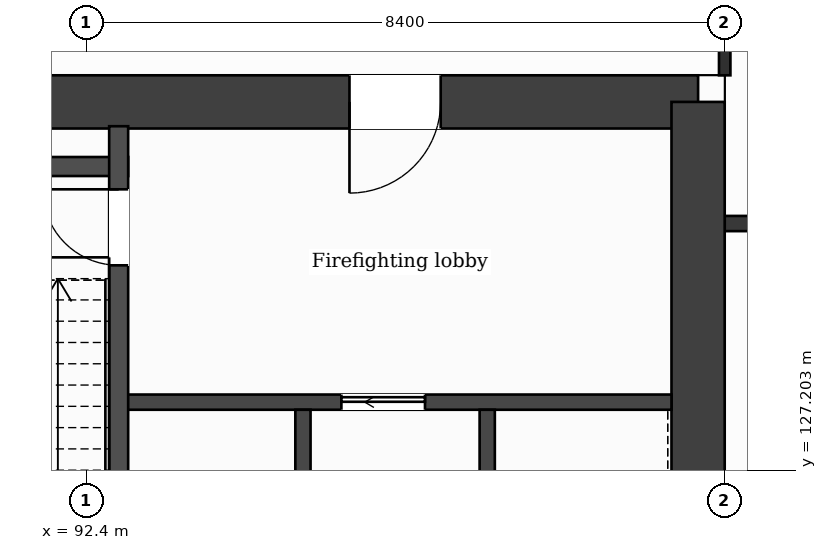
"""IFC4 building model, lengths in metres.
Left out: names, types, materials, properties, quantities, classifications, styles, units other than length and angle.
Written with IfcOpenShell. Run it as: python <this file> out.ifc"""

import sys

from ifc_helpers import new_model, si_unit, direction, frame, frame_2d, origin, place, context, subcontext, project, spatial, rectangle, extrude, element, fill, save


model = new_model("IFC4")
c1 = context("Model", 3, precision=1e-05, world=origin(), true_north=direction((0.0, 1.0)))
c2 = subcontext(c1, "Body", "Model", "MODEL_VIEW")
j1 = project(units=[si_unit("LENGTHUNIT", "METRE"), si_unit("PLANEANGLEUNIT", "RADIAN")], contexts=[c1])
p1 = place(None, origin())
s1 = spatial("IfcSite", under=j1, at=p1, CompositionType="ELEMENT")
p2 = place(p1, origin())
s2 = spatial("IfcBuilding", under=s1, at=p2, CompositionType="ELEMENT")
p3 = place(p2, frame((0.0, 0.0, 277.5)))
s3 = spatial("IfcBuildingStorey", under=s2, at=p3, CompositionType="ELEMENT", Elevation=277.5)
p4 = place(p3, frame((88.937, 132.05, 0.0), z_axis=(0.0, 0.0, 1.0), x_axis=(1.0, 0.0, 0.0)))
e1 = element("IfcWall", 1, at=p4, inside=s3, PredefinedType="SHEAR", context=c2, shape_type="SweptSolid", body=[
    extrude(rectangle(XDim=11.513, YDim=0.7, at=frame_2d((5.757, 0.0))), origin(), (0.0, 0.0, 1.0), 3.7),
])
p5 = place(p4, frame((6.927, 0.0, 0.0)))
e2 = element("IfcOpeningElement", 2, at=p5, cuts=e1, PredefinedType="OPENING", context=c2, shape_type="SweptSolid", body=[
    extrude(rectangle(XDim=1.2, YDim=2.1, at=frame_2d((0.6, 1.05))), frame((0.0, 0.36, 0.0), z_axis=(0.0, -1.0, 0.0), x_axis=(1.0, 0.0, 0.0)), (0.0, 0.0, 1.0), 0.72),
])
p6 = place(p3, frame((100.45, 132.05, 0.0), z_axis=(0.0, 0.0, 1.0), x_axis=(0.0, -1.0, 0.0)))
e3 = element("IfcWall", 3, at=p6, inside=s3, PredefinedType="SHEAR", context=c2, shape_type="SweptSolid", body=[
    extrude(rectangle(XDim=21.3, YDim=0.7, at=frame_2d((10.65, 0.0))), origin(), (0.0, 0.0, 1.0), 3.7),
])
p7 = place(p6, frame((7.9, 0.0, 0.0)))
e4 = element("IfcOpeningElement", 4, at=p7, cuts=e3, PredefinedType="OPENING", context=c2, shape_type="SweptSolid", body=[
    extrude(rectangle(XDim=1.4, YDim=2.1, at=frame_2d((0.7, 1.05))), frame((0.0, 0.36, 0.0), z_axis=(0.0, -1.0, 0.0), x_axis=(1.0, 0.0, 0.0)), (0.0, 0.0, 1.0), 0.72),
])
p8 = place(p3, frame((92.827, 128.1, 0.0), z_axis=(0.0, 0.0, 1.0), x_axis=(1.0, 0.0, 0.0)))
e5 = element("IfcWall", 5, at=p8, inside=s3, PredefinedType="PARTITIONING", context=c2, shape_type="SweptSolid", body=[
    extrude(rectangle(XDim=7.273, YDim=0.2, at=frame_2d((3.637, 0.0))), origin(), (0.0, 0.0, 1.0), 3.38),
])
p9 = place(p8, frame((2.93, 0.0, 0.0)))
e6 = element("IfcOpeningElement", 6, at=p9, cuts=e5, PredefinedType="OPENING", context=c2, shape_type="SweptSolid", body=[
    extrude(rectangle(XDim=1.1, YDim=2.1, at=frame_2d((0.55, 1.05))), frame((0.0, 0.11, 0.0), z_axis=(0.0, -1.0, 0.0), x_axis=(1.0, 0.0, 0.0)), (0.0, 0.0, 1.0), 0.22),
])
p10 = place(p3, frame((100.8, 130.45, 0.0), z_axis=(0.0, 0.0, 1.0), x_axis=(1.0, 0.0, 0.0)))
e7 = element("IfcWall", 7, at=p10, inside=s3, PredefinedType="PARTITIONING", context=c2, shape_type="SweptSolid", body=[
    extrude(rectangle(XDim=3.1, YDim=0.2, at=frame_2d((1.55, 0.0))), origin(), (0.0, 0.0, 1.0), 3.38),
])
p11 = place(p3, frame((89.146, 131.2, 0.0), z_axis=(0.0, 0.0, 1.0), x_axis=(1.0, 0.0, 0.0)))
e8 = element("IfcWall", 8, at=p11, inside=s3, PredefinedType="PARTITIONING", context=c2, shape_type="SweptSolid", body=[
    extrude(rectangle(XDim=3.806, YDim=0.25, at=frame_2d((1.903, 0.0))), origin(), (0.0, 0.0, 1.0), 3.38),
])
p12 = place(p3, frame((92.827, 124.575, 0.0), z_axis=(0.0, 0.0, 1.0), x_axis=(0.0, 1.0, 0.0)))
e9 = element("IfcWall", 9, at=p12, inside=s3, PredefinedType="PARTITIONING", context=c2, shape_type="SweptSolid", body=[
    extrude(rectangle(XDim=7.155, YDim=0.25, at=frame_2d((3.578, 0.0))), origin(), (0.0, 0.0, 1.0), 3.38),
])
p13 = place(p12, frame((5.325, 0.0, 0.0)))
e10 = element("IfcOpeningElement", 10, at=p13, cuts=e9, PredefinedType="OPENING", context=c2, shape_type="SweptSolid", body=[
    extrude(rectangle(XDim=1.0, YDim=2.1, at=frame_2d((0.5, 1.05))), frame((0.0, 0.135, 0.0), z_axis=(0.0, -1.0, 0.0), x_axis=(1.0, 0.0, 0.0)), (0.0, 0.0, 1.0), 0.27),
])
for number, where, z_axis, x_axis in (
    (11, (95.251, 124.9, 0.0), (0.0, 0.0, 1.0), (0.0, 1.0, 0.0)),
    (12, (97.676, 124.9, 0.0), (0.0, 0.0, 1.0), (0.0, 1.0, 0.0)),
):
    element("IfcWall", number, at=place(p3, frame(where, z_axis=z_axis, x_axis=x_axis)), inside=s3, PredefinedType="PARTITIONING", context=c2, shape_type="SweptSolid", body=[
        extrude(rectangle(XDim=3.1, YDim=0.2, at=frame_2d((1.55, 0.0))), origin(), (0.0, 0.0, 1.0), 3.38),
    ])
p14 = place(p3, frame((100.8, 132.4, 0.0), z_axis=(0.0, 0.0, 1.0), x_axis=(0.0, 1.0, 0.0)))
e13 = element("IfcWall", 13, at=p14, inside=s3, PredefinedType="PARTITIONING", context=c2, shape_type="SweptSolid", body=[
    extrude(rectangle(XDim=1.325, YDim=0.15, at=frame_2d((0.663, 0.0))), origin(), (0.0, 0.0, 1.0), 3.38),
])
p15 = place(p9, origin())
e14 = element("IfcDoor", 14, at=p15, inside=s3, OperationType="SLIDING_TO_LEFT", PredefinedType="DOOR", context=c2, shape_type="SweptSolid", body=[
    extrude(rectangle(XDim=1.1, YDim=2.1, at=frame_2d((0.55, 1.05))), frame((0.0, 0.025, 0.0), z_axis=(0.0, -1.0, 0.0), x_axis=(1.0, 0.0, 0.0)), (0.0, 0.0, 1.0), 0.05),
])
fill(e6, e14)
p16 = place(p13, origin())
e15 = element("IfcDoor", 15, at=p16, inside=s3, OperationType="SINGLE_SWING_RIGHT", PredefinedType="DOOR", context=c2, shape_type="SweptSolid", body=[
    extrude(rectangle(XDim=1.0, YDim=2.1, at=frame_2d((0.5, 1.05))), frame((0.0, 0.025, 0.0), z_axis=(0.0, -1.0, 0.0), x_axis=(1.0, 0.0, 0.0)), (0.0, 0.0, 1.0), 0.05),
])
fill(e10, e15)
p17 = place(p5, origin())
e16 = element("IfcDoor", 16, at=p17, inside=s3, OperationType="SINGLE_SWING_LEFT", PredefinedType="DOOR", context=c2, shape_type="SweptSolid", body=[
    extrude(rectangle(XDim=1.2, YDim=2.1, at=frame_2d((0.6, 1.05))), frame((0.0, 0.025, 0.0), z_axis=(0.0, -1.0, 0.0), x_axis=(1.0, 0.0, 0.0)), (0.0, 0.0, 1.0), 0.05),
])
fill(e2, e16)
save(model, sys.argv[1])
